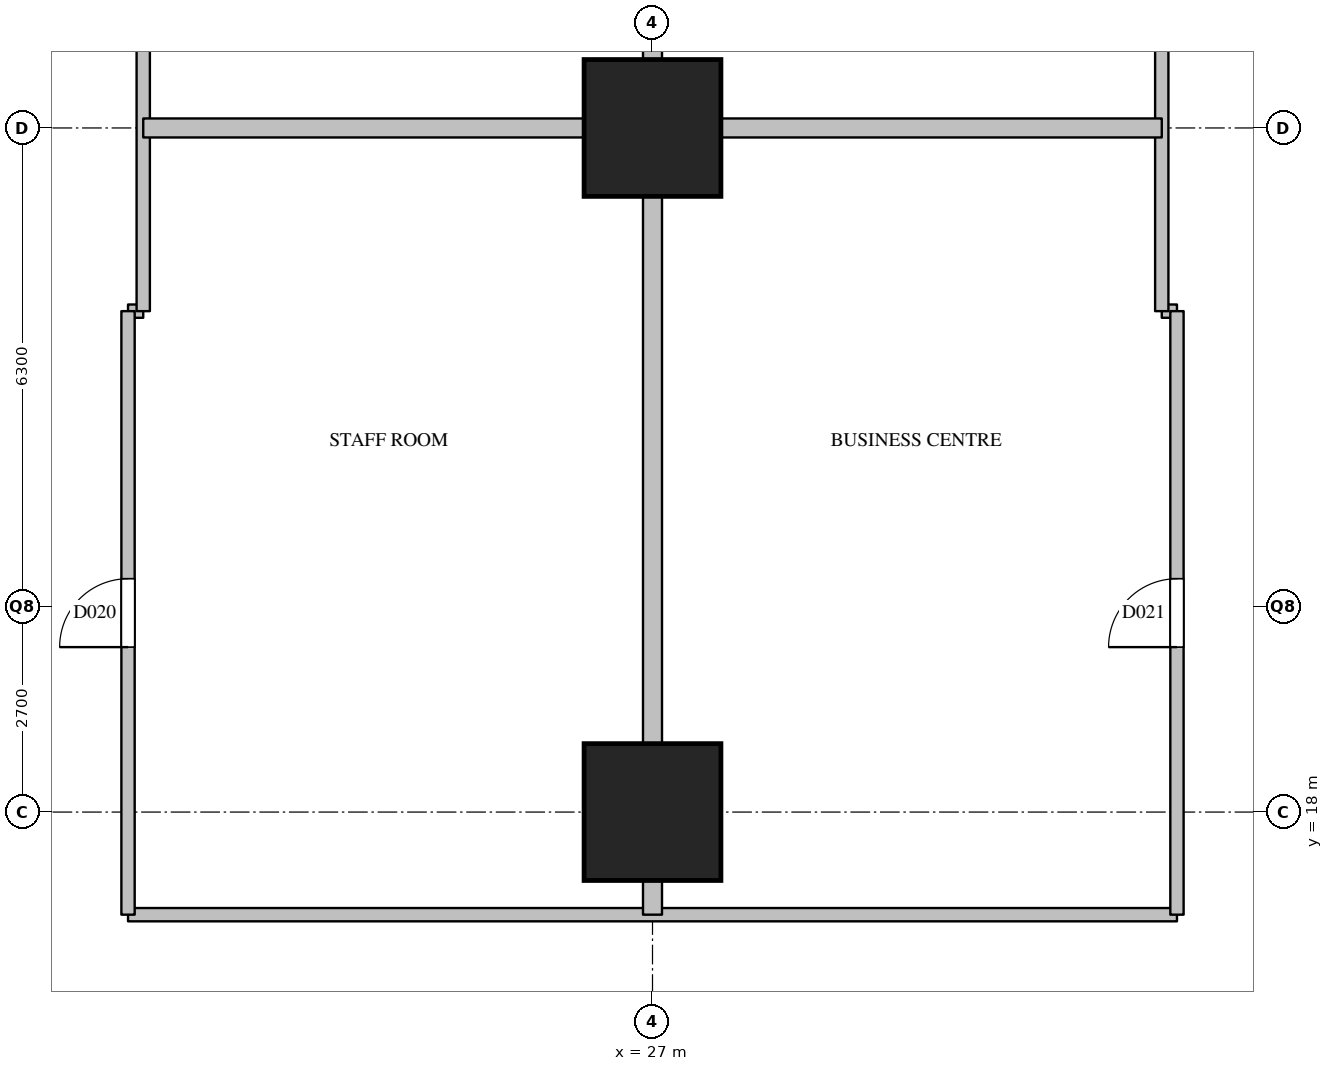
"""IFC4 building model, lengths in metres.
Left out: names, types, materials, properties, quantities, classifications, styles, units other than length and angle.
Written with IfcOpenShell. Run it as: python <this file> out.ifc"""

import sys

from ifc_helpers import new_model, si_unit, direction, frame, frame_2d, origin, origin_2d, place, context, subcontext, project, spatial, rectangle, extrude, element, fill, save


model = new_model("IFC4")
c1 = context("Model", 3, precision=1e-05, world=origin(), true_north=direction((0.0, 1.0)))
c2 = subcontext(c1, "Body", "Model", "MODEL_VIEW")
j1 = project(units=[si_unit("LENGTHUNIT", "METRE"), si_unit("PLANEANGLEUNIT", "RADIAN")], contexts=[c1])
p1 = place(None, origin())
s1 = spatial("IfcSite", under=j1, at=p1, CompositionType="ELEMENT")
p2 = place(p1, origin())
s2 = spatial("IfcBuilding", under=s1, at=p2, CompositionType="ELEMENT")
p3 = place(p2, frame((0.0, 0.0, 53.8)))
s3 = spatial("IfcBuildingStorey", under=s2, at=p3, CompositionType="ELEMENT", Elevation=53.8)
for number, where, z_axis, x_axis in (
    (1, (27.0, 18.0, 0.0), (0.0, 0.0, 1.0), (1.0, 0.0, 0.0)),
    (2, (27.0, 27.0, 0.0), (0.0, 0.0, 1.0), (1.0, 0.0, 0.0)),
):
    element("IfcColumn", number, at=place(p3, frame(where, z_axis=z_axis, x_axis=x_axis)), inside=s3, PredefinedType="COLUMN", context=c2, shape_type="SweptSolid", body=[
        extrude(rectangle(XDim=1.8, YDim=1.8, at=origin_2d()), origin(), (0.0, 0.0, 1.0), 3.8),
    ])
p4 = place(p3, frame((20.1, 16.65, 0.0), z_axis=(0.0, 0.0, 1.0), x_axis=(1.0, 0.0, 0.0)))
e3 = element("IfcWall", 3, at=p4, inside=s3, PredefinedType="PARTITIONING", context=c2, shape_type="SweptSolid", body=[
    extrude(rectangle(XDim=13.8, YDim=0.175, at=frame_2d((6.9, 0.0))), origin(), (0.0, 0.0, 1.0), 2.5),
])
for number, where, z_axis, x_axis in (
    (4, (20.1, 24.59, 0.0), (0.0, 0.0, 1.0), (1.0, 0.0, 0.0)),
    (5, (33.7, 24.59, 0.0), (0.0, 0.0, 1.0), (1.0, 0.0, 0.0)),
):
    element("IfcWall", number, at=place(p3, frame(where, z_axis=z_axis, x_axis=x_axis)), inside=s3, PredefinedType="PARTITIONING", context=c2, shape_type="SweptSolid", body=[
        extrude(rectangle(XDim=0.2, YDim=0.175, at=frame_2d((0.1, 0.0))), origin(), (0.0, 0.0, 1.0), 3.5),
    ])
p5 = place(p3, frame((20.1, 16.65, 0.0), z_axis=(0.0, 0.0, 1.0), x_axis=(0.0, 1.0, 0.0)))
e6 = element("IfcWall", 6, at=p5, inside=s3, PredefinedType="PARTITIONING", context=c2, shape_type="SweptSolid", body=[
    extrude(rectangle(XDim=7.94, YDim=0.175, at=frame_2d((3.97, 0.0))), origin(), (0.0, 0.0, 1.0), 3.5),
])
p6 = place(p5, frame((3.52, 0.0, 0.0)))
e7 = element("IfcOpeningElement", 7, at=p6, cuts=e6, PredefinedType="OPENING", context=c2, shape_type="SweptSolid", body=[
    extrude(rectangle(XDim=0.9, YDim=2.1, at=frame_2d((0.45, 1.05))), frame((0.0, 0.097, 0.0), z_axis=(0.0, -1.0, 0.0), x_axis=(1.0, 0.0, 0.0)), (0.0, 0.0, 1.0), 0.195),
])
for number, where, z_axis, x_axis in (
    (8, (20.3, 24.59, 0.0), (0.0, 0.0, 1.0), (0.0, 1.0, 0.0)),
    (9, (33.7, 24.59, 0.0), (0.0, 0.0, 1.0), (0.0, 1.0, 0.0)),
):
    element("IfcWall", number, at=place(p3, frame(where, z_axis=z_axis, x_axis=x_axis)), inside=s3, PredefinedType="PARTITIONING", context=c2, shape_type="SweptSolid", body=[
        extrude(rectangle(XDim=3.93, YDim=0.175, at=frame_2d((1.965, 0.0))), origin(), (0.0, 0.0, 1.0), 2.5),
    ])
p7 = place(p3, frame((33.9, 16.65, 0.0), z_axis=(0.0, 0.0, 1.0), x_axis=(0.0, 1.0, 0.0)))
e10 = element("IfcWall", 10, at=p7, inside=s3, PredefinedType="PARTITIONING", context=c2, shape_type="SweptSolid", body=[
    extrude(rectangle(XDim=7.94, YDim=0.175, at=frame_2d((3.97, 0.0))), origin(), (0.0, 0.0, 1.0), 3.5),
])
p8 = place(p7, frame((3.52, 0.0, 0.0)))
e11 = element("IfcOpeningElement", 11, at=p8, cuts=e10, PredefinedType="OPENING", context=c2, shape_type="SweptSolid", body=[
    extrude(rectangle(XDim=0.9, YDim=2.1, at=frame_2d((0.45, 1.05))), frame((0.0, 0.097, 0.0), z_axis=(0.0, -1.0, 0.0), x_axis=(1.0, 0.0, 0.0)), (0.0, 0.0, 1.0), 0.195),
])
p9 = place(p3, frame((20.3, 27.0, 0.0), z_axis=(0.0, 0.0, 1.0), x_axis=(1.0, 0.0, 0.0)))
e12 = element("IfcWall", 12, at=p9, inside=s3, PredefinedType="PARTITIONING", context=c2, shape_type="SweptSolid", body=[
    extrude(rectangle(XDim=13.4, YDim=0.25, at=frame_2d((6.7, 0.0))), origin(), (0.0, 0.0, 1.0), 2.5),
])
p10 = place(p3, frame((27.0, 16.65, 0.0), z_axis=(0.0, 0.0, 1.0), x_axis=(0.0, 1.0, 0.0)))
e13 = element("IfcWall", 13, at=p10, inside=s3, PredefinedType="PARTITIONING", context=c2, shape_type="SweptSolid", body=[
    extrude(rectangle(XDim=24.9, YDim=0.25, at=frame_2d((12.45, 0.0))), origin(), (0.0, 0.0, 1.0), 2.5),
])
p11 = place(p6, origin())
e14 = element("IfcDoor", 14, at=p11, inside=s3, OperationType="SINGLE_SWING_LEFT", PredefinedType="DOOR", context=c2, shape_type="SweptSolid", body=[
    extrude(rectangle(XDim=0.9, YDim=2.1, at=frame_2d((0.45, 1.05))), frame((0.0, 0.025, 0.0), z_axis=(0.0, -1.0, 0.0), x_axis=(1.0, 0.0, 0.0)), (0.0, 0.0, 1.0), 0.05),
])
fill(e7, e14)
p12 = place(p8, origin())
e15 = element("IfcDoor", 15, at=p12, inside=s3, OperationType="SINGLE_SWING_LEFT", PredefinedType="DOOR", context=c2, shape_type="SweptSolid", body=[
    extrude(rectangle(XDim=0.9, YDim=2.1, at=frame_2d((0.45, 1.05))), frame((0.0, 0.025, 0.0), z_axis=(0.0, -1.0, 0.0), x_axis=(1.0, 0.0, 0.0)), (0.0, 0.0, 1.0), 0.05),
])
fill(e11, e15)
save(model, sys.argv[1])
